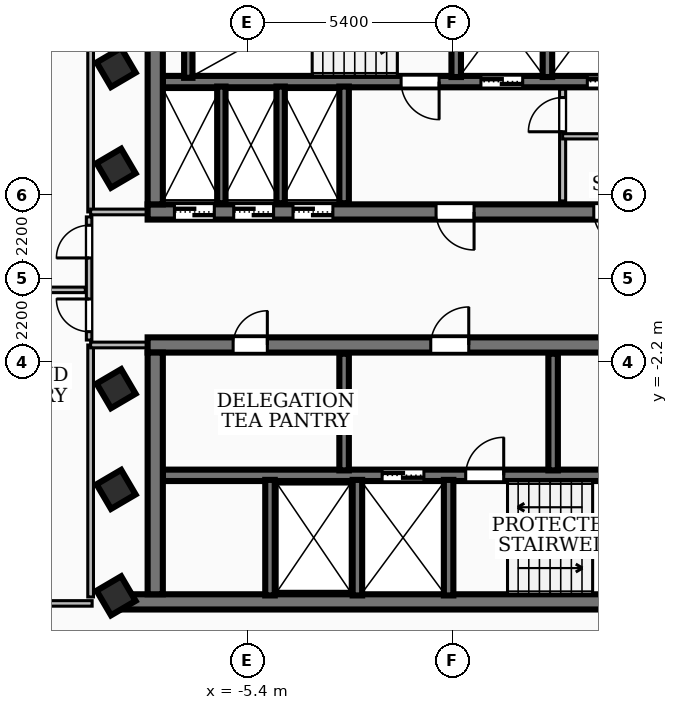
"""IFC4 building model, lengths in metres.
Left out: names, types, materials, properties, quantities, classifications, styles, units other than length and angle.
Written with IfcOpenShell. Run it as: python <this file> out.ifc"""

import sys

from ifc_helpers import new_model, si_unit, direction, frame, frame_2d, origin, origin_2d, place, context, subcontext, project, spatial, rectangle, extrude, element, fill, save


model = new_model("IFC4")
c1 = context("Model", 3, precision=1e-05, world=origin(), true_north=direction((0.0, 1.0)))
c2 = subcontext(c1, "Body", "Model", "MODEL_VIEW")
j1 = project(units=[si_unit("LENGTHUNIT", "METRE"), si_unit("PLANEANGLEUNIT", "RADIAN")], contexts=[c1])
p1 = place(None, origin())
s1 = spatial("IfcSite", under=j1, at=p1, CompositionType="ELEMENT")
p2 = place(p1, origin())
s2 = spatial("IfcBuilding", under=s1, at=p2, CompositionType="ELEMENT")
p3 = place(p2, frame((0.0, 0.0, 205.2)))
s3 = spatial("IfcBuildingStorey", under=s2, at=p3, CompositionType="ELEMENT", Elevation=205.2)
p4 = place(p3, frame((8.02, 1.75, 0.0), z_axis=(0.0, 0.0, 1.0), x_axis=(-1.0, 0.0, 0.0)))
e1 = element("IfcWall", 1, at=p4, inside=s3, PredefinedType="SHEAR", context=c2, shape_type="SweptSolid", body=[
    extrude(rectangle(XDim=16.04, YDim=0.4, at=frame_2d((8.02, 0.0))), origin(), (0.0, 0.0, 1.0), 3.16),
])
p5 = place(p4, frame((7.45, 0.0, 0.0)))
e2 = element("IfcOpeningElement", 2, at=p5, cuts=e1, PredefinedType="OPENING", context=c2, shape_type="SweptSolid", body=[
    extrude(rectangle(XDim=1.0, YDim=2.1, at=frame_2d((0.5, 1.05))), frame((0.0, 0.21, 0.0), z_axis=(0.0, -1.0, 0.0), x_axis=(1.0, 0.0, 0.0)), (0.0, 0.0, 1.0), 0.42),
])
p6 = place(p4, frame((14.285, 0.0, 0.0)))
e3 = element("IfcOpeningElement", 3, at=p6, cuts=e1, PredefinedType="OPENING", context=c2, shape_type="SweptSolid", body=[
    extrude(rectangle(XDim=1.05, YDim=2.15, at=frame_2d((0.525, 1.075))), frame((0.0, 0.21, 0.0), z_axis=(0.0, -1.0, 0.0), x_axis=(1.0, 0.0, 0.0)), (0.0, 0.0, 1.0), 0.42),
])
p7 = place(p4, frame((12.725, 0.0, 0.0)))
e4 = element("IfcOpeningElement", 4, at=p7, cuts=e1, PredefinedType="OPENING", context=c2, shape_type="SweptSolid", body=[
    extrude(rectangle(XDim=1.05, YDim=2.15, at=frame_2d((0.525, 1.075))), frame((0.0, 0.21, 0.0), z_axis=(0.0, -1.0, 0.0), x_axis=(1.0, 0.0, 0.0)), (0.0, 0.0, 1.0), 0.42),
])
p8 = place(p4, frame((11.165, 0.0, 0.0)))
e5 = element("IfcOpeningElement", 5, at=p8, cuts=e1, PredefinedType="OPENING", context=c2, shape_type="SweptSolid", body=[
    extrude(rectangle(XDim=1.05, YDim=2.15, at=frame_2d((0.525, 1.075))), frame((0.0, 0.21, 0.0), z_axis=(0.0, -1.0, 0.0), x_axis=(1.0, 0.0, 0.0)), (0.0, 0.0, 1.0), 0.42),
])
p9 = place(p4, frame((3.4, 0.0, 0.0)))
e6 = element("IfcOpeningElement", 6, at=p9, cuts=e1, PredefinedType="OPENING", context=c2, shape_type="SweptSolid", body=[
    extrude(rectangle(XDim=0.9, YDim=2.06, at=frame_2d((0.45, 1.03))), frame((0.0, 0.21, 0.0), z_axis=(0.0, -1.0, 0.0), x_axis=(1.0, 0.0, 0.0)), (0.0, 0.0, 1.0), 0.42),
])
p10 = place(p4, frame((1.1, 0.0, 0.0)))
e7 = element("IfcOpeningElement", 7, at=p10, cuts=e1, PredefinedType="OPENING", context=c2, shape_type="SweptSolid", body=[
    extrude(rectangle(XDim=0.9, YDim=2.06, at=frame_2d((0.45, 1.03))), frame((0.0, 0.21, 0.0), z_axis=(0.0, -1.0, 0.0), x_axis=(1.0, 0.0, 0.0)), (0.0, 0.0, 1.0), 0.42),
])
p11 = place(p3, frame((-7.82, 1.95, 0.0), z_axis=(0.0, 0.0, 1.0), x_axis=(0.0, 1.0, 0.0)))
e8 = element("IfcWall", 8, at=p11, inside=s3, PredefinedType="SHEAR", context=c2, shape_type="SweptSolid", body=[
    extrude(rectangle(XDim=6.36, YDim=0.4, at=frame_2d((3.18, 0.0))), origin(), (0.0, 0.0, 1.0), 3.16),
])
p12 = place(p3, frame((7.62, 5.18, 0.0), z_axis=(0.0, 0.0, 1.0), x_axis=(-1.0, 0.0, 0.0)))
e9 = element("IfcWall", 9, at=p12, inside=s3, PredefinedType="SOLIDWALL", context=c2, shape_type="SweptSolid", body=[
    extrude(rectangle(XDim=15.24, YDim=0.3, at=frame_2d((7.62, 0.0))), origin(), (0.0, 0.0, 1.0), 3.16),
])
p13 = place(p12, frame((5.77, 0.0, 0.0)))
e10 = element("IfcOpeningElement", 10, at=p13, cuts=e9, PredefinedType="OPENING", context=c2, shape_type="SweptSolid", body=[
    extrude(rectangle(XDim=1.1, YDim=2.15, at=frame_2d((0.55, 1.075))), frame((0.0, 0.16, 0.0), z_axis=(0.0, -1.0, 0.0), x_axis=(1.0, 0.0, 0.0)), (0.0, 0.0, 1.0), 0.32),
])
p14 = place(p12, frame((2.97, 0.0, 0.0)))
e11 = element("IfcOpeningElement", 11, at=p14, cuts=e9, PredefinedType="OPENING", context=c2, shape_type="SweptSolid", body=[
    extrude(rectangle(XDim=1.1, YDim=2.15, at=frame_2d((0.55, 1.075))), frame((0.0, 0.16, 0.0), z_axis=(0.0, -1.0, 0.0), x_axis=(1.0, 0.0, 0.0)), (0.0, 0.0, 1.0), 0.32),
])
p15 = place(p12, frame((7.97, 0.0, 0.0)))
e12 = element("IfcOpeningElement", 12, at=p15, cuts=e9, PredefinedType="OPENING", context=c2, shape_type="SweptSolid", body=[
    extrude(rectangle(XDim=1.0, YDim=2.1, at=frame_2d((0.5, 1.05))), frame((0.0, 0.16, 0.0), z_axis=(0.0, -1.0, 0.0), x_axis=(1.0, 0.0, 0.0)), (0.0, 0.0, 1.0), 0.32),
])
p16 = place(p3, frame((8.78, -8.51, 0.0), z_axis=(0.0, 0.0, 1.0), x_axis=(-1.0, 0.0, 0.0)))
e13 = element("IfcWall", 13, at=p16, inside=s3, PredefinedType="SHEAR", context=c2, shape_type="SweptSolid", body=[
    extrude(rectangle(XDim=17.56, YDim=0.4, at=frame_2d((8.78, 0.0))), origin(), (0.0, 0.0, 1.0), 3.16),
])
p17 = place(p3, frame((-8.02, -1.75, 0.0), z_axis=(0.0, 0.0, 1.0), x_axis=(1.0, 0.0, 0.0)))
e14 = element("IfcWall", 14, at=p17, inside=s3, PredefinedType="SHEAR", context=c2, shape_type="SweptSolid", body=[
    extrude(rectangle(XDim=16.04, YDim=0.4, at=frame_2d((8.02, 0.0))), origin(), (0.0, 0.0, 1.0), 3.16),
])
p18 = place(p17, frame((7.45, 0.0, 0.0)))
e15 = element("IfcOpeningElement", 15, at=p18, cuts=e14, PredefinedType="OPENING", context=c2, shape_type="SweptSolid", body=[
    extrude(rectangle(XDim=1.0, YDim=2.1, at=frame_2d((0.5, 1.05))), frame((0.0, 0.21, 0.0), z_axis=(0.0, -1.0, 0.0), x_axis=(1.0, 0.0, 0.0)), (0.0, 0.0, 1.0), 0.42),
])
p19 = place(p17, frame((12.65, 0.0, 0.0)))
e16 = element("IfcOpeningElement", 16, at=p19, cuts=e14, PredefinedType="OPENING", context=c2, shape_type="SweptSolid", body=[
    extrude(rectangle(XDim=0.9, YDim=2.06, at=frame_2d((0.45, 1.03))), frame((0.0, 0.21, 0.0), z_axis=(0.0, -1.0, 0.0), x_axis=(1.0, 0.0, 0.0)), (0.0, 0.0, 1.0), 0.42),
])
p20 = place(p17, frame((2.25, 0.0, 0.0)))
e17 = element("IfcOpeningElement", 17, at=p20, cuts=e14, PredefinedType="OPENING", context=c2, shape_type="SweptSolid", body=[
    extrude(rectangle(XDim=0.9, YDim=2.06, at=frame_2d((0.45, 1.03))), frame((0.0, 0.21, 0.0), z_axis=(0.0, -1.0, 0.0), x_axis=(1.0, 0.0, 0.0)), (0.0, 0.0, 1.0), 0.42),
])
p21 = place(p3, frame((-7.82, -8.31, 0.0), z_axis=(0.0, 0.0, 1.0), x_axis=(0.0, 1.0, 0.0)))
e18 = element("IfcWall", 18, at=p21, inside=s3, PredefinedType="SHEAR", context=c2, shape_type="SweptSolid", body=[
    extrude(rectangle(XDim=6.36, YDim=0.4, at=frame_2d((3.18, 0.0))), origin(), (0.0, 0.0, 1.0), 3.16),
])
p22 = place(p3, frame((-7.62, -5.18, 0.0), z_axis=(0.0, 0.0, 1.0), x_axis=(1.0, 0.0, 0.0)))
e19 = element("IfcWall", 19, at=p22, inside=s3, PredefinedType="SOLIDWALL", context=c2, shape_type="SweptSolid", body=[
    extrude(rectangle(XDim=15.24, YDim=0.3, at=frame_2d((7.62, 0.0))), origin(), (0.0, 0.0, 1.0), 3.16),
])
p23 = place(p22, frame((5.77, 0.0, 0.0)))
e20 = element("IfcOpeningElement", 20, at=p23, cuts=e19, PredefinedType="OPENING", context=c2, shape_type="SweptSolid", body=[
    extrude(rectangle(XDim=1.1, YDim=2.15, at=frame_2d((0.55, 1.075))), frame((0.0, 0.16, 0.0), z_axis=(0.0, -1.0, 0.0), x_axis=(1.0, 0.0, 0.0)), (0.0, 0.0, 1.0), 0.32),
])
p24 = place(p22, frame((7.97, 0.0, 0.0)))
e21 = element("IfcOpeningElement", 21, at=p24, cuts=e19, PredefinedType="OPENING", context=c2, shape_type="SweptSolid", body=[
    extrude(rectangle(XDim=1.0, YDim=2.1, at=frame_2d((0.5, 1.05))), frame((0.0, 0.16, 0.0), z_axis=(0.0, -1.0, 0.0), x_axis=(1.0, 0.0, 0.0)), (0.0, 0.0, 1.0), 0.32),
])
p25 = place(p3, frame((-6.95, 5.28, 0.0), z_axis=(0.0, 0.0, 1.0), x_axis=(0.0, 1.0, 0.0)))
e22 = element("IfcWall", 22, at=p25, inside=s3, PredefinedType="SOLIDWALL", context=c2, shape_type="SweptSolid", body=[
    extrude(rectangle(XDim=3.06, YDim=0.22, at=frame_2d((1.53, 0.0))), origin(), (0.0, 0.0, 1.0), 3.16),
])
for number, where, z_axis, x_axis in (
    (23, (0.1, 5.3, 0.0), (0.0, 0.0, 1.0), (0.0, 1.0, 0.0)),
    (24, (2.5, 5.3, 0.0), (0.0, 0.0, 1.0), (0.0, 1.0, 0.0)),
):
    element("IfcWall", number, at=place(p3, frame(where, z_axis=z_axis, x_axis=x_axis)), inside=s3, PredefinedType="SOLIDWALL", context=c2, shape_type="SweptSolid", body=[
        extrude(rectangle(XDim=3.04, YDim=0.25, at=frame_2d((1.52, 0.0))), origin(), (0.0, 0.0, 1.0), 3.16),
    ])
p26 = place(p3, frame((-2.85, 1.98, 0.0), z_axis=(0.0, 0.0, 1.0), x_axis=(0.0, 1.0, 0.0)))
e25 = element("IfcWall", 25, at=p26, inside=s3, PredefinedType="SOLIDWALL", context=c2, shape_type="SweptSolid", body=[
    extrude(rectangle(XDim=3.07, YDim=0.25, at=frame_2d((1.535, 0.0))), origin(), (0.0, 0.0, 1.0), 3.16),
])
for number, where, z_axis, x_axis in (
    (26, (-0.1, -8.34, 0.0), (0.0, 0.0, 1.0), (0.0, 1.0, 0.0)),
    (27, (-2.5, -8.34, 0.0), (0.0, 0.0, 1.0), (0.0, 1.0, 0.0)),
    (28, (-4.8, -8.34, 0.0), (0.0, 0.0, 1.0), (0.0, 1.0, 0.0)),
):
    element("IfcWall", number, at=place(p3, frame(where, z_axis=z_axis, x_axis=x_axis)), inside=s3, PredefinedType="SOLIDWALL", context=c2, shape_type="SweptSolid", body=[
        extrude(rectangle(XDim=3.04, YDim=0.25, at=frame_2d((1.52, 0.0))), origin(), (0.0, 0.0, 1.0), 3.16),
    ])
for number, where, z_axis, x_axis in (
    (29, (-2.85, -5.05, 0.0), (0.0, 0.0, 1.0), (0.0, 1.0, 0.0)),
    (30, (2.65, -5.05, 0.0), (0.0, 0.0, 1.0), (0.0, 1.0, 0.0)),
):
    element("IfcWall", number, at=place(p3, frame(where, z_axis=z_axis, x_axis=x_axis)), inside=s3, PredefinedType="SOLIDWALL", context=c2, shape_type="SweptSolid", body=[
        extrude(rectangle(XDim=3.07, YDim=0.25, at=frame_2d((1.535, 0.0))), origin(), (0.0, 0.0, 1.0), 3.16),
    ])
for number, where, z_axis, x_axis in (
    (31, (-6.08, 1.98, 0.0), (0.0, 0.0, 1.0), (0.0, 1.0, 0.0)),
    (32, (-4.52, 1.98, 0.0), (0.0, 0.0, 1.0), (0.0, 1.0, 0.0)),
):
    element("IfcWall", number, at=place(p3, frame(where, z_axis=z_axis, x_axis=x_axis)), inside=s3, PredefinedType="SOLIDWALL", context=c2, shape_type="SweptSolid", body=[
        extrude(rectangle(XDim=3.07, YDim=0.22, at=frame_2d((1.535, 0.0))), origin(), (0.0, 0.0, 1.0), 3.16),
    ])
for number, where, z_axis, x_axis in (
    (33, (-8.85, -5.55, 0.0), (0.0, 0.0, 1.0), (0.863, 0.506, 0.0)),
    (34, (-8.85, -2.9, 0.0), (0.0, 0.0, 1.0), (0.863, 0.506, 0.0)),
    (35, (-8.85, 2.9, 0.0), (0.0, 0.0, 1.0), (0.863, 0.506, 0.0)),
    (36, (-8.85, 5.55, 0.0), (0.0, 0.0, 1.0), (0.863, 0.506, 0.0)),
    (37, (-8.85, -8.35, 0.0), (0.0, 0.0, 1.0), (0.863, 0.506, 0.0)),
):
    element("IfcColumn", number, at=place(p3, frame(where, z_axis=z_axis, x_axis=x_axis)), inside=s3, PredefinedType="COLUMN", context=c2, shape_type="SweptSolid", body=[
        extrude(rectangle(XDim=0.75, YDim=0.75, at=origin_2d()), origin(), (0.0, 0.0, 1.0), 3.42),
    ])
p27 = place(p3, frame((-5.904, -18.492, 0.0), z_axis=(0.0, 0.0, 1.0), x_axis=(-0.506046465446, 0.862506217258, 0.0)))
e38 = element("IfcWall", 38, at=p27, inside=s3, PredefinedType="SOLIDWALL", context=c2, shape_type="SweptSolid", body=[
    extrude(rectangle(XDim=25.924, YDim=0.2, at=frame_2d((12.962, 0.0))), origin(), (0.0, 0.0, 1.0), 3.16),
])
p28 = place(p27, frame((0.85, 0.0, 0.85)))
e39 = element("IfcOpeningElement", 39, at=p28, cuts=e38, PredefinedType="OPENING", context=c2, shape_type="SweptSolid", body=[
    extrude(rectangle(XDim=1.8, YDim=2.0, at=frame_2d((0.9, 1.0))), frame((0.0, 0.11, 0.0), z_axis=(0.0, -1.0, 0.0), x_axis=(1.0, 0.0, 0.0)), (0.0, 0.0, 1.0), 0.22),
])
p29 = place(p3, frame((2.9, 2.04, 0.0), z_axis=(0.0, 0.0, 1.0), x_axis=(0.0, 1.0, 0.0)))
e40 = element("IfcWall", 40, at=p29, inside=s3, PredefinedType="PARTITIONING", context=c2, shape_type="SweptSolid", body=[
    extrude(rectangle(XDim=2.94, YDim=0.16, at=frame_2d((1.47, 0.0))), origin(), (0.0, 0.0, 1.0), 2.39),
])
p30 = place(p29, frame((1.82, 0.0, 0.0)))
e41 = element("IfcOpeningElement", 41, at=p30, cuts=e40, PredefinedType="OPENING", context=c2, shape_type="SweptSolid", body=[
    extrude(rectangle(XDim=0.9, YDim=2.06, at=frame_2d((0.45, 1.03))), frame((0.0, 0.09, 0.0), z_axis=(0.0, -1.0, 0.0), x_axis=(1.0, 0.0, 0.0)), (0.0, 0.0, 1.0), 0.18),
])
p31 = place(p3, frame((2.9, 3.74, 0.0), z_axis=(0.0, 0.0, 1.0), x_axis=(1.0, 0.0, 0.0)))
e42 = element("IfcWall", 42, at=p31, inside=s3, PredefinedType="PARTITIONING", context=c2, shape_type="SweptSolid", body=[
    extrude(rectangle(XDim=4.65, YDim=0.138, at=frame_2d((2.325, 0.0))), origin(), (0.0, 0.0, 1.0), 3.16),
])
p32 = place(p3, frame((-9.52, 1.75, 0.0), z_axis=(0.0, 0.0, 1.0), x_axis=(0.0, 1.0, 0.0)))
e43 = element("IfcWall", 43, at=p32, inside=s3, PredefinedType="PARTITIONING", context=c2, shape_type="SweptSolid", body=[
    extrude(rectangle(XDim=6.63, YDim=0.15, at=frame_2d((3.315, 0.0))), origin(), (0.0, 0.0, 1.0), 3.16),
])
p33 = place(p3, frame((-7.85, 1.75, 0.0), z_axis=(0.0, 0.0, 1.0), x_axis=(-1.0, 0.0, 0.0)))
e44 = element("IfcWall", 44, at=p33, inside=s3, PredefinedType="PARTITIONING", context=c2, shape_type="SweptSolid", body=[
    extrude(rectangle(XDim=1.67, YDim=0.15, at=frame_2d((0.835, 0.0))), origin(), (0.0, 0.0, 1.0), 2.39),
])
p34 = place(p3, frame((-9.52, -8.38, 0.0), z_axis=(0.0, 0.0, 1.0), x_axis=(0.0, 1.0, 0.0)))
e45 = element("IfcWall", 45, at=p34, inside=s3, PredefinedType="PARTITIONING", context=c2, shape_type="SweptSolid", body=[
    extrude(rectangle(XDim=6.63, YDim=0.15, at=frame_2d((3.315, 0.0))), origin(), (0.0, 0.0, 1.0), 3.16),
])
p35 = place(p3, frame((-7.85, -1.75, 0.0), z_axis=(0.0, 0.0, 1.0), x_axis=(-1.0, 0.0, 0.0)))
e46 = element("IfcWall", 46, at=p35, inside=s3, PredefinedType="PARTITIONING", context=c2, shape_type="SweptSolid", body=[
    extrude(rectangle(XDim=1.67, YDim=0.15, at=frame_2d((0.835, 0.0))), origin(), (0.0, 0.0, 1.0), 2.39),
])
p36 = place(p3, frame((-16.502, -0.3, 0.0), z_axis=(0.0, 0.0, 1.0), x_axis=(1.0, 0.0, 0.0)))
e47 = element("IfcWall", 47, at=p36, inside=s3, PredefinedType="PARTITIONING", context=c2, shape_type="SweptSolid", body=[
    extrude(rectangle(XDim=6.842, YDim=0.145, at=frame_2d((3.421, 0.0))), origin(), (0.0, 0.0, 1.0), 3.16),
])
p37 = place(p3, frame((-11.662, -8.55, 0.0), z_axis=(0.0, 0.0, 1.0), x_axis=(1.0, 0.0, 0.0)))
e48 = element("IfcWall", 48, at=p37, inside=s3, PredefinedType="PARTITIONING", context=c2, shape_type="SweptSolid", body=[
    extrude(rectangle(XDim=2.182, YDim=0.145, at=frame_2d((1.091, 0.0))), origin(), (0.0, 0.0, 1.0), 3.16),
])
p38 = place(p3, frame((-9.56, -1.62, 0.0), z_axis=(0.0, 0.0, 1.0), x_axis=(0.0, 1.0, 0.0)))
e49 = element("IfcWall", 49, at=p38, inside=s3, PredefinedType="PARTITIONING", context=c2, shape_type="SweptSolid", body=[
    extrude(rectangle(XDim=3.24, YDim=0.145, at=frame_2d((1.62, 0.0))), origin(), (0.0, 0.0, 1.0), 3.16),
])
p39 = place(p38, frame((0.22, 0.0, 0.0)))
e50 = element("IfcOpeningElement", 50, at=p39, cuts=e49, PredefinedType="OPENING", context=c2, shape_type="SweptSolid", body=[
    extrude(rectangle(XDim=0.86, YDim=2.04, at=frame_2d((0.43, 1.02))), frame((0.0, 0.083, 0.0), z_axis=(0.0, -1.0, 0.0), x_axis=(1.0, 0.0, 0.0)), (0.0, 0.0, 1.0), 0.165),
])
p40 = place(p38, frame((2.16, 0.0, 0.0)))
e51 = element("IfcOpeningElement", 51, at=p40, cuts=e49, PredefinedType="OPENING", context=c2, shape_type="SweptSolid", body=[
    extrude(rectangle(XDim=0.86, YDim=2.04, at=frame_2d((0.43, 1.02))), frame((0.0, 0.083, 0.0), z_axis=(0.0, -1.0, 0.0), x_axis=(1.0, 0.0, 0.0)), (0.0, 0.0, 1.0), 0.165),
])
p41 = place(p3, frame((15.873, -7.255, 0.0), z_axis=(0.0, 0.0, 1.0), x_axis=(-0.862498672631, -0.506059324299, 0.0)))
e52 = element("IfcWall", 52, at=p41, inside=s3, PredefinedType="PARTITIONING", context=c2, shape_type="SweptSolid", body=[
    extrude(rectangle(XDim=20.039, YDim=0.145, at=frame_2d((10.02, 0.0))), origin(), (0.0, 0.0, 1.0), 2.53),
])
p42 = place(p41, frame((9.42, 0.0, 0.0)))
e53 = element("IfcOpeningElement", 53, at=p42, cuts=e52, PredefinedType="OPENING", context=c2, shape_type="SweptSolid", body=[
    extrude(rectangle(XDim=1.2, YDim=2.1, at=frame_2d((0.6, 1.05))), frame((0.0, 0.083, 0.0), z_axis=(0.0, -1.0, 0.0), x_axis=(1.0, 0.0, 0.0)), (0.0, 0.0, 1.0), 0.165),
])
p43 = place(p5, origin())
e54 = element("IfcDoor", 54, at=p43, inside=s3, OperationType="SINGLE_SWING_LEFT", PredefinedType="DOOR", context=c2, shape_type="SweptSolid", body=[
    extrude(rectangle(XDim=1.0, YDim=2.1, at=frame_2d((0.5, 1.05))), frame((0.0, 0.025, 0.0), z_axis=(0.0, -1.0, 0.0), x_axis=(1.0, 0.0, 0.0)), (0.0, 0.0, 1.0), 0.05),
])
fill(e2, e54)
p44 = place(p18, origin())
e55 = element("IfcDoor", 55, at=p44, inside=s3, OperationType="SINGLE_SWING_RIGHT", PredefinedType="DOOR", context=c2, shape_type="SweptSolid", body=[
    extrude(rectangle(XDim=1.0, YDim=2.1, at=frame_2d((0.5, 1.05))), frame((0.0, 0.025, 0.0), z_axis=(0.0, -1.0, 0.0), x_axis=(1.0, 0.0, 0.0)), (0.0, 0.0, 1.0), 0.05),
])
fill(e15, e55)
p45 = place(p13, origin())
e56 = element("IfcDoor", 56, at=p45, inside=s3, OperationType="DOUBLE_DOOR_SLIDING", PredefinedType="DOOR", context=c2, shape_type="SweptSolid", body=[
    extrude(rectangle(XDim=1.1, YDim=2.15, at=frame_2d((0.55, 1.075))), frame((0.0, 0.025, 0.0), z_axis=(0.0, -1.0, 0.0), x_axis=(1.0, 0.0, 0.0)), (0.0, 0.0, 1.0), 0.05),
])
fill(e10, e56)
p46 = place(p14, origin())
e57 = element("IfcDoor", 57, at=p46, inside=s3, OperationType="DOUBLE_DOOR_SLIDING", PredefinedType="DOOR", context=c2, shape_type="SweptSolid", body=[
    extrude(rectangle(XDim=1.1, YDim=2.15, at=frame_2d((0.55, 1.075))), frame((0.0, 0.025, 0.0), z_axis=(0.0, -1.0, 0.0), x_axis=(1.0, 0.0, 0.0)), (0.0, 0.0, 1.0), 0.05),
])
fill(e11, e57)
p47 = place(p15, origin())
e58 = element("IfcDoor", 58, at=p47, inside=s3, OperationType="SINGLE_SWING_LEFT", PredefinedType="DOOR", context=c2, shape_type="SweptSolid", body=[
    extrude(rectangle(XDim=1.0, YDim=2.1, at=frame_2d((0.5, 1.05))), frame((0.0, 0.025, 0.0), z_axis=(0.0, -1.0, 0.0), x_axis=(1.0, 0.0, 0.0)), (0.0, 0.0, 1.0), 0.05),
])
fill(e12, e58)
p48 = place(p23, origin())
e59 = element("IfcDoor", 59, at=p48, inside=s3, OperationType="DOUBLE_DOOR_SLIDING", PredefinedType="DOOR", context=c2, shape_type="SweptSolid", body=[
    extrude(rectangle(XDim=1.1, YDim=2.15, at=frame_2d((0.55, 1.075))), frame((0.0, 0.025, 0.0), z_axis=(0.0, -1.0, 0.0), x_axis=(1.0, 0.0, 0.0)), (0.0, 0.0, 1.0), 0.05),
])
fill(e20, e59)
p49 = place(p24, origin())
e60 = element("IfcDoor", 60, at=p49, inside=s3, OperationType="SINGLE_SWING_RIGHT", PredefinedType="DOOR", context=c2, shape_type="SweptSolid", body=[
    extrude(rectangle(XDim=1.0, YDim=2.1, at=frame_2d((0.5, 1.05))), frame((0.0, 0.025, 0.0), z_axis=(0.0, -1.0, 0.0), x_axis=(1.0, 0.0, 0.0)), (0.0, 0.0, 1.0), 0.05),
])
fill(e21, e60)
p50 = place(p6, origin())
e61 = element("IfcDoor", 61, at=p50, inside=s3, OperationType="DOUBLE_DOOR_SLIDING", PredefinedType="DOOR", context=c2, shape_type="SweptSolid", body=[
    extrude(rectangle(XDim=1.05, YDim=2.15, at=frame_2d((0.525, 1.075))), frame((0.0, 0.025, 0.0), z_axis=(0.0, -1.0, 0.0), x_axis=(1.0, 0.0, 0.0)), (0.0, 0.0, 1.0), 0.05),
])
fill(e3, e61)
p51 = place(p7, origin())
e62 = element("IfcDoor", 62, at=p51, inside=s3, OperationType="DOUBLE_DOOR_SLIDING", PredefinedType="DOOR", context=c2, shape_type="SweptSolid", body=[
    extrude(rectangle(XDim=1.05, YDim=2.15, at=frame_2d((0.525, 1.075))), frame((0.0, 0.025, 0.0), z_axis=(0.0, -1.0, 0.0), x_axis=(1.0, 0.0, 0.0)), (0.0, 0.0, 1.0), 0.05),
])
fill(e4, e62)
p52 = place(p8, origin())
e63 = element("IfcDoor", 63, at=p52, inside=s3, OperationType="DOUBLE_DOOR_SLIDING", PredefinedType="DOOR", context=c2, shape_type="SweptSolid", body=[
    extrude(rectangle(XDim=1.05, YDim=2.15, at=frame_2d((0.525, 1.075))), frame((0.0, 0.025, 0.0), z_axis=(0.0, -1.0, 0.0), x_axis=(1.0, 0.0, 0.0)), (0.0, 0.0, 1.0), 0.05),
])
fill(e5, e63)
p53 = place(p20, origin())
e64 = element("IfcDoor", 64, at=p53, inside=s3, OperationType="SINGLE_SWING_RIGHT", PredefinedType="DOOR", context=c2, shape_type="SweptSolid", body=[
    extrude(rectangle(XDim=0.9, YDim=2.06, at=frame_2d((0.45, 1.03))), frame((0.0, 0.025, 0.0), z_axis=(0.0, -1.0, 0.0), x_axis=(1.0, 0.0, 0.0)), (0.0, 0.0, 1.0), 0.05),
])
fill(e17, e64)
p54 = place(p9, origin())
e65 = element("IfcDoor", 65, at=p54, inside=s3, OperationType="SINGLE_SWING_LEFT", PredefinedType="DOOR", context=c2, shape_type="SweptSolid", body=[
    extrude(rectangle(XDim=0.9, YDim=2.06, at=frame_2d((0.45, 1.03))), frame((0.0, 0.025, 0.0), z_axis=(0.0, -1.0, 0.0), x_axis=(1.0, 0.0, 0.0)), (0.0, 0.0, 1.0), 0.05),
])
fill(e6, e65)
p55 = place(p30, origin())
e66 = element("IfcDoor", 66, at=p55, inside=s3, OperationType="SINGLE_SWING_LEFT", PredefinedType="DOOR", context=c2, shape_type="SweptSolid", body=[
    extrude(rectangle(XDim=0.9, YDim=2.06, at=frame_2d((0.45, 1.03))), frame((0.0, 0.025, 0.0), z_axis=(0.0, -1.0, 0.0), x_axis=(1.0, 0.0, 0.0)), (0.0, 0.0, 1.0), 0.05),
])
fill(e41, e66)
p56 = place(p39, origin())
e67 = element("IfcDoor", 67, at=p56, inside=s3, OperationType="SINGLE_SWING_RIGHT", PredefinedType="DOOR", context=c2, shape_type="SweptSolid", body=[
    extrude(rectangle(XDim=0.86, YDim=2.04, at=frame_2d((0.43, 1.02))), frame((0.0, 0.025, 0.0), z_axis=(0.0, -1.0, 0.0), x_axis=(1.0, 0.0, 0.0)), (0.0, 0.0, 1.0), 0.05),
])
fill(e50, e67)
p57 = place(p40, origin())
e68 = element("IfcDoor", 68, at=p57, inside=s3, OperationType="SINGLE_SWING_LEFT", PredefinedType="DOOR", context=c2, shape_type="SweptSolid", body=[
    extrude(rectangle(XDim=0.86, YDim=2.04, at=frame_2d((0.43, 1.02))), frame((0.0, 0.025, 0.0), z_axis=(0.0, -1.0, 0.0), x_axis=(1.0, 0.0, 0.0)), (0.0, 0.0, 1.0), 0.05),
])
fill(e51, e68)
save(model, sys.argv[1])
